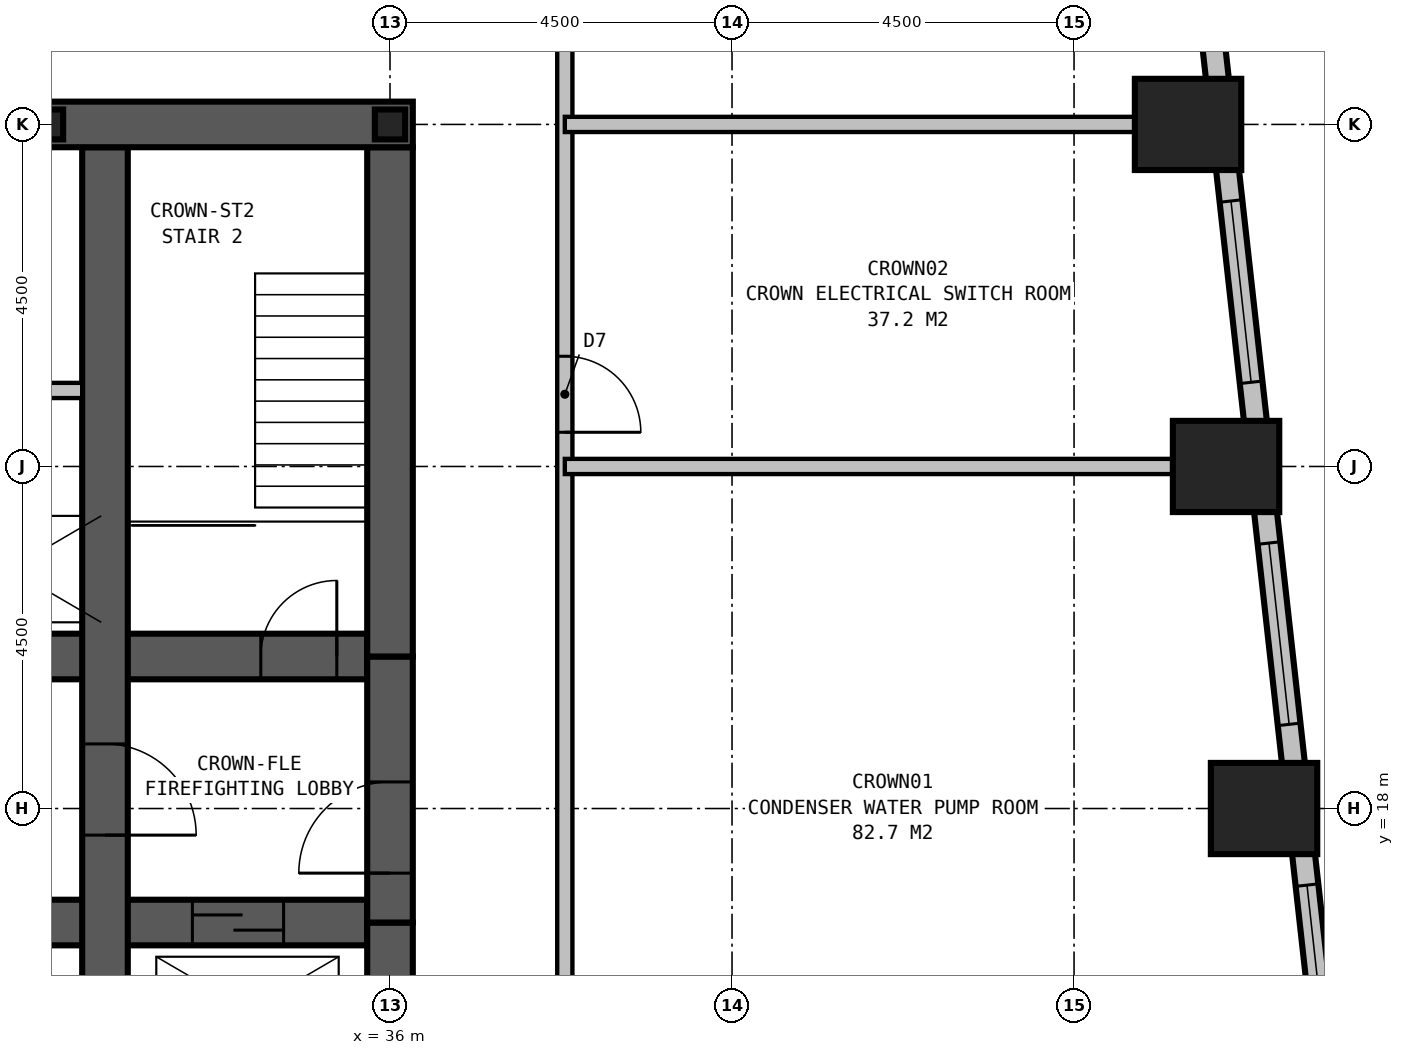
"""IFC4 building model, lengths in metres.
Left out: names, types, materials, properties, quantities, classifications, styles, units other than length and angle.
Written with IfcOpenShell. Run it as: python <this file> out.ifc"""

import sys

from ifc_helpers import new_model, si_unit, direction, frame, frame_2d, origin, origin_2d, place, context, subcontext, project, spatial, polyline, rectangle, i_section, outline, extrude, clip, halfspace, element, fill, save


model = new_model("IFC4")
c1 = context("Model", 3, precision=1e-05, world=origin(), true_north=direction((0.0, 1.0)))
c2 = subcontext(c1, "Body", "Model", "MODEL_VIEW")
j1 = project(units=[si_unit("LENGTHUNIT", "METRE"), si_unit("PLANEANGLEUNIT", "RADIAN")], contexts=[c1])
p1 = place(None, origin())
s1 = spatial("IfcSite", under=j1, at=p1, CompositionType="ELEMENT")
p2 = place(p1, origin())
s2 = spatial("IfcBuilding", under=s1, at=p2, CompositionType="ELEMENT")
p3 = place(p2, frame((0.0, 0.0, 289.7)))
s3 = spatial("IfcBuildingStorey", under=s2, at=p3, CompositionType="ELEMENT", Elevation=289.7)
p4 = place(p3, frame((47.5, 18.0, 0.0), z_axis=(0.0, 0.0, 1.0), x_axis=(1.0, 0.0, 0.0)))
e1 = element("IfcColumn", 1, at=p4, inside=s3, PredefinedType="COLUMN", context=c2, shape_type="Clipping", body=[
    clip(extrude(rectangle(XDim=1.4, YDim=1.2, at=origin_2d()), origin(), (0.0, 0.0, 1.0), 17.623), halfspace(frame((0.0, 0.0, 17.671), z_axis=(-0.294483896091, -0.25767390908, 0.920262675285), x_axis=(0.952424195267, 0.0, 0.304775576894)), False)),
])
p5 = place(p3, frame((47.0, 22.5, 0.0), z_axis=(0.0, 0.0, 1.0), x_axis=(1.0, 0.0, 0.0)))
e2 = element("IfcColumn", 2, at=p5, inside=s3, PredefinedType="COLUMN", context=c2, shape_type="Clipping", body=[
    clip(extrude(rectangle(XDim=1.4, YDim=1.2, at=origin_2d()), origin(), (0.0, 0.0, 1.0), 18.723), halfspace(frame((0.0, 0.0, 18.771), z_axis=(-0.294483896091, -0.25767390908, 0.920262675285), x_axis=(0.952424195267, 0.0, 0.304775576894)), False)),
])
p6 = place(p3, frame((46.5, 27.0, 0.0), z_axis=(0.0, 0.0, 1.0), x_axis=(1.0, 0.0, 0.0)))
e3 = element("IfcColumn", 3, at=p6, inside=s3, PredefinedType="COLUMN", context=c2, shape_type="Clipping", body=[
    clip(extrude(rectangle(XDim=1.4, YDim=1.2, at=origin_2d()), origin(), (0.0, 0.0, 1.0), 19.823), halfspace(frame((0.0, 0.0, 19.871), z_axis=(-0.294483896091, -0.25767390908, 0.920262675285), x_axis=(0.952424195267, 0.0, 0.304775576894)), False)),
])
p7 = place(p3, frame((36.3, 27.0, 0.0), z_axis=(0.0, 0.0, 1.0), x_axis=(-1.0, 0.0, 0.0)))
e4 = element("IfcWall", 4, at=p7, inside=s3, PredefinedType="SHEAR", context=c2, shape_type="SweptSolid", body=[
    extrude(rectangle(XDim=23.6, YDim=0.6, at=frame_2d((11.8, 0.0))), origin(), (0.0, 0.0, 1.0), 4.0),
])
p8 = place(p7, frame((17.05, 0.0, 0.0)))
e5 = element("IfcOpeningElement", 5, at=p8, cuts=e4, PredefinedType="OPENING", context=c2, shape_type="SweptSolid", body=[
    extrude(rectangle(XDim=1.0, YDim=2.1, at=frame_2d((0.5, 1.05))), frame((0.0, 0.31, 0.0), z_axis=(0.0, -1.0, 0.0), x_axis=(1.0, 0.0, 0.0)), (0.0, 0.0, 1.0), 0.62),
])
p9 = place(p7, frame((12.05, 0.0, 0.0)))
e6 = element("IfcOpeningElement", 6, at=p9, cuts=e4, PredefinedType="OPENING", context=c2, shape_type="SweptSolid", body=[
    extrude(rectangle(XDim=1.0, YDim=2.1, at=frame_2d((0.5, 1.05))), frame((0.0, 0.31, 0.0), z_axis=(0.0, -1.0, 0.0), x_axis=(1.0, 0.0, 0.0)), (0.0, 0.0, 1.0), 0.62),
])
p10 = place(p7, frame((7.05, 0.0, 0.0)))
e7 = element("IfcOpeningElement", 7, at=p10, cuts=e4, PredefinedType="OPENING", context=c2, shape_type="SweptSolid", body=[
    extrude(rectangle(XDim=1.0, YDim=2.1, at=frame_2d((0.5, 1.05))), frame((0.0, 0.31, 0.0), z_axis=(0.0, -1.0, 0.0), x_axis=(1.0, 0.0, 0.0)), (0.0, 0.0, 1.0), 0.62),
])
p11 = place(p3, frame((32.25, 13.8, 0.0), z_axis=(0.0, 0.0, 1.0), x_axis=(0.0, 1.0, 0.0)))
e8 = element("IfcWall", 8, at=p11, inside=s3, PredefinedType="SHEAR", context=c2, shape_type="SweptSolid", body=[
    extrude(rectangle(XDim=12.9, YDim=0.6, at=frame_2d((6.45, 0.0))), origin(), (0.0, 0.0, 1.0), 4.0),
])
p12 = place(p11, frame((5.05, 0.0, 0.0), z_axis=(0.0, 0.0, 1.0), x_axis=(-1.0, 0.0, 0.0)))
e9 = element("IfcOpeningElement", 9, at=p12, cuts=e8, PredefinedType="OPENING", context=c2, shape_type="SweptSolid", body=[
    extrude(rectangle(XDim=1.2, YDim=2.1, at=frame_2d((0.6, 1.05))), frame((0.0, 0.31, 0.0), z_axis=(0.0, -1.0, 0.0), x_axis=(1.0, 0.0, 0.0)), (0.0, 0.0, 1.0), 0.62),
])
p13 = place(p3, frame((13.8, 16.5, 0.0), z_axis=(0.0, 0.0, 1.0), x_axis=(1.0, 0.0, 0.0)))
e10 = element("IfcWall", 10, at=p13, inside=s3, PredefinedType="SHEAR", context=c2, shape_type="SweptSolid", body=[
    extrude(rectangle(XDim=21.9, YDim=0.6, at=frame_2d((10.95, 0.0))), origin(), (0.0, 0.0, 1.0), 4.0),
])
p14 = place(p13, frame((5.75, 0.0, 0.0), z_axis=(0.0, 0.0, 1.0), x_axis=(-1.0, 0.0, 0.0)))
e11 = element("IfcOpeningElement", 11, at=p14, cuts=e10, PredefinedType="OPENING", context=c2, shape_type="SweptSolid", body=[
    extrude(rectangle(XDim=1.0, YDim=2.1, at=frame_2d((0.5, 1.05))), frame((0.0, 0.31, 0.0), z_axis=(0.0, -1.0, 0.0), x_axis=(1.0, 0.0, 0.0)), (0.0, 0.0, 1.0), 0.62),
])
p15 = place(p13, frame((10.2, 0.0, 0.0), z_axis=(0.0, 0.0, 1.0), x_axis=(-1.0, 0.0, 0.0)))
e12 = element("IfcOpeningElement", 12, at=p15, cuts=e10, PredefinedType="OPENING", context=c2, shape_type="SweptSolid", body=[
    extrude(rectangle(XDim=1.0, YDim=2.1, at=frame_2d((0.5, 1.05))), frame((0.0, 0.31, 0.0), z_axis=(0.0, -1.0, 0.0), x_axis=(1.0, 0.0, 0.0)), (0.0, 0.0, 1.0), 0.62),
])
p16 = place(p13, frame((12.7, 0.0, 0.0), z_axis=(0.0, 0.0, 1.0), x_axis=(-1.0, 0.0, 0.0)))
e13 = element("IfcOpeningElement", 13, at=p16, cuts=e10, PredefinedType="OPENING", context=c2, shape_type="SweptSolid", body=[
    extrude(rectangle(XDim=1.0, YDim=2.1, at=frame_2d((0.5, 1.05))), frame((0.0, 0.31, 0.0), z_axis=(0.0, -1.0, 0.0), x_axis=(1.0, 0.0, 0.0)), (0.0, 0.0, 1.0), 0.62),
])
p17 = place(p13, frame((17.15, 0.0, 0.0), z_axis=(0.0, 0.0, 1.0), x_axis=(-1.0, 0.0, 0.0)))
e14 = element("IfcOpeningElement", 14, at=p17, cuts=e10, PredefinedType="OPENING", context=c2, shape_type="SweptSolid", body=[
    extrude(rectangle(XDim=1.0, YDim=2.1, at=frame_2d((0.5, 1.05))), frame((0.0, 0.31, 0.0), z_axis=(0.0, -1.0, 0.0), x_axis=(1.0, 0.0, 0.0)), (0.0, 0.0, 1.0), 0.62),
])
p18 = place(p13, frame((0.6, 0.0, 0.0)))
e15 = element("IfcOpeningElement", 15, at=p18, cuts=e10, PredefinedType="OPENING", context=c2, shape_type="SweptSolid", body=[
    extrude(rectangle(XDim=1.2, YDim=2.1, at=frame_2d((0.6, 1.05))), frame((0.0, 0.31, 0.0), z_axis=(0.0, -1.0, 0.0), x_axis=(1.0, 0.0, 0.0)), (0.0, 0.0, 1.0), 0.62),
])
p19 = place(p13, frame((19.6, 0.0, 0.0)))
e16 = element("IfcOpeningElement", 16, at=p19, cuts=e10, PredefinedType="OPENING", context=c2, shape_type="SweptSolid", body=[
    extrude(rectangle(XDim=1.2, YDim=2.1, at=frame_2d((0.6, 1.05))), frame((0.0, 0.31, 0.0), z_axis=(0.0, -1.0, 0.0), x_axis=(1.0, 0.0, 0.0)), (0.0, 0.0, 1.0), 0.62),
])
p20 = place(p3, frame((13.8, 20.0, 0.0), z_axis=(0.0, 0.0, 1.0), x_axis=(1.0, 0.0, 0.0)))
e17 = element("IfcWall", 17, at=p20, inside=s3, PredefinedType="SHEAR", context=c2, shape_type="SweptSolid", body=[
    extrude(rectangle(XDim=21.9, YDim=0.6, at=frame_2d((10.95, 0.0))), origin(), (0.0, 0.0, 1.0), 4.0),
])
p21 = place(p20, frame((0.5, 0.0, 0.0)))
e18 = element("IfcOpeningElement", 18, at=p21, cuts=e17, PredefinedType="OPENING", context=c2, shape_type="SweptSolid", body=[
    extrude(rectangle(XDim=1.0, YDim=2.1, at=frame_2d((0.5, 1.05))), frame((0.0, 0.31, 0.0), z_axis=(0.0, -1.0, 0.0), x_axis=(1.0, 0.0, 0.0)), (0.0, 0.0, 1.0), 0.62),
])
p22 = place(p20, frame((20.5, 0.0, 0.0)))
e19 = element("IfcOpeningElement", 19, at=p22, cuts=e17, PredefinedType="OPENING", context=c2, shape_type="SweptSolid", body=[
    extrude(rectangle(XDim=1.0, YDim=2.1, at=frame_2d((0.5, 1.05))), frame((0.0, 0.31, 0.0), z_axis=(0.0, -1.0, 0.0), x_axis=(1.0, 0.0, 0.0)), (0.0, 0.0, 1.0), 0.62),
])
p23 = place(p20, frame((4.75, 0.0, 0.0)))
e20 = element("IfcOpeningElement", 20, at=p23, cuts=e17, PredefinedType="OPENING", context=c2, shape_type="SweptSolid", body=[
    extrude(rectangle(XDim=1.0, YDim=2.1, at=frame_2d((0.5, 1.05))), frame((0.0, 0.31, 0.0), z_axis=(0.0, -1.0, 0.0), x_axis=(1.0, 0.0, 0.0)), (0.0, 0.0, 1.0), 0.62),
])
p24 = place(p20, frame((6.7, 0.0, 0.0)))
e21 = element("IfcOpeningElement", 21, at=p24, cuts=e17, PredefinedType="OPENING", context=c2, shape_type="SweptSolid", body=[
    extrude(rectangle(XDim=1.0, YDim=2.1, at=frame_2d((0.5, 1.05))), frame((0.0, 0.31, 0.0), z_axis=(0.0, -1.0, 0.0), x_axis=(1.0, 0.0, 0.0)), (0.0, 0.0, 1.0), 0.62),
])
p25 = place(p3, frame((36.0, 13.8, 0.0), z_axis=(0.0, 0.0, 1.0), x_axis=(0.0, 1.0, 0.0)))
e22 = element("IfcWall", 22, at=p25, inside=s3, PredefinedType="SHEAR", context=c2, shape_type="SweptSolid", body=[
    extrude(rectangle(XDim=2.7, YDim=0.6, at=frame_2d((1.35, 0.0))), origin(), (0.0, 0.0, 1.0), 4.0),
])
p26 = place(p3, frame((36.0, 16.5, 0.0), z_axis=(0.0, 0.0, 1.0), x_axis=(0.0, 1.0, 0.0)))
e23 = element("IfcWall", 23, at=p26, inside=s3, PredefinedType="SHEAR", context=c2, shape_type="SweptSolid", body=[
    extrude(rectangle(XDim=3.5, YDim=0.6, at=frame_2d((1.75, 0.0))), origin(), (0.0, 0.0, 1.0), 4.0),
])
p27 = place(p26, frame((0.65, 0.0, 0.0)))
e24 = element("IfcOpeningElement", 24, at=p27, cuts=e23, PredefinedType="OPENING", context=c2, shape_type="SweptSolid", body=[
    extrude(rectangle(XDim=1.2, YDim=2.1, at=frame_2d((0.6, 1.05))), frame((0.0, 0.31, 0.0), z_axis=(0.0, -1.0, 0.0), x_axis=(1.0, 0.0, 0.0)), (0.0, 0.0, 1.0), 0.62),
])
p28 = place(p3, frame((36.0, 20.0, 0.0), z_axis=(0.0, 0.0, 1.0), x_axis=(0.0, 1.0, 0.0)))
e25 = element("IfcWall", 25, at=p28, inside=s3, PredefinedType="SHEAR", context=c2, shape_type="SweptSolid", body=[
    extrude(rectangle(XDim=6.7, YDim=0.6, at=frame_2d((3.35, 0.0))), origin(), (0.0, 0.0, 1.0), 4.0),
])
p29 = place(p3, frame((31.5, 27.0, 4.0), z_axis=(0.0, 0.0, 1.0), x_axis=(1.0, 0.0, 0.0)))
e26 = element("IfcColumn", 26, at=p29, inside=s3, PredefinedType="COLUMN", context=c2, shape_type="SweptSolid", body=[
    extrude(i_section(OverallWidth=0.399, OverallDepth=0.394, WebThickness=0.023, FlangeThickness=0.037, FilletRadius=0.015, at=origin_2d()), origin(), (0.0, 0.0, 1.0), 10.05),
])
p30 = place(p3, frame((36.0, 27.0, 4.0), z_axis=(0.0, 0.0, 1.0), x_axis=(1.0, 0.0, 0.0)))
e27 = element("IfcColumn", 27, at=p30, inside=s3, PredefinedType="COLUMN", context=c2, shape_type="SweptSolid", body=[
    extrude(i_section(OverallWidth=0.399, OverallDepth=0.394, WebThickness=0.023, FlangeThickness=0.037, FilletRadius=0.015, at=origin_2d()), origin(), (0.0, 0.0, 1.0), 11.49),
])
p31 = place(p3, frame((49.519, 3.901, -0.3), z_axis=(0.0, 0.0, 1.0), x_axis=(-0.110429082637, 0.993884006164, 0.0)))
e28 = element("IfcWall", 28, at=p31, inside=s3, PredefinedType="STANDARD", context=c2, shape_type="Clipping", body=[
    clip(extrude(outline(polyline([(0.0, 0.0), (32.899, 0.0), (32.899, 22.662), (0.0, 14.669), (0.0, 0.0)])), frame((0.0, 0.15, 0.0), z_axis=(0.0, -1.0, 0.0), x_axis=(1.0, 0.0, 0.0)), (0.0, 0.0, 1.0), 0.3), halfspace(frame((0.0, 0.0, 14.669), z_axis=(-0.223578390543, 0.321137527797, 0.920262675285), x_axis=(0.971732868163, 0.0, 0.236083105984)), False)),
])
p32 = place(p31, frame((1.717, 0.0, 0.8)))
e29 = element("IfcOpeningElement", 29, at=p32, cuts=e28, PredefinedType="OPENING", context=c2, shape_type="SweptSolid", body=[
    extrude(rectangle(XDim=2.4, YDim=1.8, at=frame_2d((1.2, 0.9))), frame((0.0, 0.16, 0.0), z_axis=(0.0, -1.0, 0.0), x_axis=(1.0, 0.0, 0.0)), (0.0, 0.0, 1.0), 0.32),
])
p33 = place(p31, frame((6.245, 0.0, 0.8)))
e30 = element("IfcOpeningElement", 30, at=p33, cuts=e28, PredefinedType="OPENING", context=c2, shape_type="SweptSolid", body=[
    extrude(rectangle(XDim=2.4, YDim=1.8, at=frame_2d((1.2, 0.9))), frame((0.0, 0.16, 0.0), z_axis=(0.0, -1.0, 0.0), x_axis=(1.0, 0.0, 0.0)), (0.0, 0.0, 1.0), 0.32),
])
p34 = place(p31, frame((10.772, 0.0, 0.8)))
e31 = element("IfcOpeningElement", 31, at=p34, cuts=e28, PredefinedType="OPENING", context=c2, shape_type="SweptSolid", body=[
    extrude(rectangle(XDim=2.4, YDim=1.8, at=frame_2d((1.2, 0.9))), frame((0.0, 0.16, 0.0), z_axis=(0.0, -1.0, 0.0), x_axis=(1.0, 0.0, 0.0)), (0.0, 0.0, 1.0), 0.32),
])
p35 = place(p31, frame((15.3, 0.0, 0.8)))
e32 = element("IfcOpeningElement", 32, at=p35, cuts=e28, PredefinedType="OPENING", context=c2, shape_type="SweptSolid", body=[
    extrude(rectangle(XDim=2.4, YDim=1.8, at=frame_2d((1.2, 0.9))), frame((0.0, 0.16, 0.0), z_axis=(0.0, -1.0, 0.0), x_axis=(1.0, 0.0, 0.0)), (0.0, 0.0, 1.0), 0.32),
])
p36 = place(p31, frame((19.828, 0.0, 0.8)))
e33 = element("IfcOpeningElement", 33, at=p36, cuts=e28, PredefinedType="OPENING", context=c2, shape_type="SweptSolid", body=[
    extrude(rectangle(XDim=2.4, YDim=1.8, at=frame_2d((1.2, 0.9))), frame((0.0, 0.16, 0.0), z_axis=(0.0, -1.0, 0.0), x_axis=(1.0, 0.0, 0.0)), (0.0, 0.0, 1.0), 0.32),
])
p37 = place(p31, frame((24.355, 0.0, 0.8)))
e34 = element("IfcOpeningElement", 34, at=p37, cuts=e28, PredefinedType="OPENING", context=c2, shape_type="SweptSolid", body=[
    extrude(rectangle(XDim=2.4, YDim=1.8, at=frame_2d((1.2, 0.9))), frame((0.0, 0.16, 0.0), z_axis=(0.0, -1.0, 0.0), x_axis=(1.0, 0.0, 0.0)), (0.0, 0.0, 1.0), 0.32),
])
p38 = place(p31, frame((28.883, 0.0, 0.8)))
e35 = element("IfcOpeningElement", 35, at=p38, cuts=e28, PredefinedType="OPENING", context=c2, shape_type="SweptSolid", body=[
    extrude(rectangle(XDim=2.4, YDim=1.8, at=frame_2d((1.2, 0.9))), frame((0.0, 0.16, 0.0), z_axis=(0.0, -1.0, 0.0), x_axis=(1.0, 0.0, 0.0)), (0.0, 0.0, 1.0), 0.32),
])
p39 = place(p3, frame((38.3, 11.2, 0.0), z_axis=(0.0, 0.0, 1.0), x_axis=(0.0, 1.0, 0.0)))
e36 = element("IfcWall", 36, at=p39, inside=s3, PredefinedType="PARTITIONING", context=c2, shape_type="SweptSolid", body=[
    extrude(rectangle(XDim=18.1, YDim=0.2, at=frame_2d((9.05, 0.0))), origin(), (0.0, 0.0, 1.0), 4.0),
])
p40 = place(p39, frame((3.95, 0.0, 0.0), z_axis=(0.0, 0.0, 1.0), x_axis=(-1.0, 0.0, 0.0)))
e37 = element("IfcOpeningElement", 37, at=p40, cuts=e36, PredefinedType="OPENING", context=c2, shape_type="SweptSolid", body=[
    extrude(rectangle(XDim=1.2, YDim=2.1, at=frame_2d((0.6, 1.05))), frame((0.0, 0.11, 0.0), z_axis=(0.0, -1.0, 0.0), x_axis=(1.0, 0.0, 0.0)), (0.0, 0.0, 1.0), 0.22),
])
p41 = place(p39, frame((12.75, 0.0, 0.0), z_axis=(0.0, 0.0, 1.0), x_axis=(-1.0, 0.0, 0.0)))
e38 = element("IfcOpeningElement", 38, at=p41, cuts=e36, PredefinedType="OPENING", context=c2, shape_type="SweptSolid", body=[
    extrude(rectangle(XDim=1.0, YDim=2.1, at=frame_2d((0.5, 1.05))), frame((0.0, 0.11, 0.0), z_axis=(0.0, -1.0, 0.0), x_axis=(1.0, 0.0, 0.0)), (0.0, 0.0, 1.0), 0.22),
])
p42 = place(p3, frame((38.3, 22.5, 0.0), z_axis=(0.0, 0.0, 1.0), x_axis=(1.0, 0.0, 0.0)))
e39 = element("IfcWall", 39, at=p42, inside=s3, PredefinedType="PARTITIONING", context=c2, shape_type="SweptSolid", body=[
    extrude(rectangle(XDim=7.999, YDim=0.2, at=frame_2d((4.0, 0.0))), origin(), (0.0, 0.0, 1.0), 4.0),
])
p43 = place(p3, frame((38.3, 27.0, 0.0), z_axis=(0.0, 0.0, 1.0), x_axis=(1.0, 0.0, 0.0)))
e40 = element("IfcWall", 40, at=p43, inside=s3, PredefinedType="PARTITIONING", context=c2, shape_type="SweptSolid", body=[
    extrude(rectangle(XDim=7.499, YDim=0.2, at=frame_2d((3.75, 0.0))), origin(), (0.0, 0.0, 1.0), 4.0),
])
p44 = place(p3, frame((17.55, 23.5, 0.0), z_axis=(0.0, 0.0, 1.0), x_axis=(1.0, 0.0, 0.0)))
e41 = element("IfcWall", 41, at=p44, inside=s3, PredefinedType="PARTITIONING", context=c2, shape_type="SweptSolid", body=[
    extrude(rectangle(XDim=14.4, YDim=0.2, at=frame_2d((7.2, 0.0))), origin(), (0.0, 0.0, 1.0), 4.0),
])
p45 = place(p34, origin())
e42 = element("IfcWindow", 42, at=p45, inside=s3, PartitioningType="SINGLE_PANEL", PredefinedType="USERDEFINED", context=c2, shape_type="SweptSolid", body=[
    extrude(rectangle(XDim=2.4, YDim=1.8, at=frame_2d((1.2, 0.9))), frame((0.0, 0.03, 0.0), z_axis=(0.0, -1.0, 0.0), x_axis=(1.0, 0.0, 0.0)), (0.0, 0.0, 1.0), 0.06),
])
fill(e31, e42)
p46 = place(p35, origin())
e43 = element("IfcWindow", 43, at=p46, inside=s3, PartitioningType="SINGLE_PANEL", PredefinedType="USERDEFINED", context=c2, shape_type="SweptSolid", body=[
    extrude(rectangle(XDim=2.4, YDim=1.8, at=frame_2d((1.2, 0.9))), frame((0.0, 0.03, 0.0), z_axis=(0.0, -1.0, 0.0), x_axis=(1.0, 0.0, 0.0)), (0.0, 0.0, 1.0), 0.06),
])
fill(e32, e43)
p47 = place(p36, origin())
e44 = element("IfcWindow", 44, at=p47, inside=s3, PartitioningType="SINGLE_PANEL", PredefinedType="USERDEFINED", context=c2, shape_type="SweptSolid", body=[
    extrude(rectangle(XDim=2.4, YDim=1.8, at=frame_2d((1.2, 0.9))), frame((0.0, 0.03, 0.0), z_axis=(0.0, -1.0, 0.0), x_axis=(1.0, 0.0, 0.0)), (0.0, 0.0, 1.0), 0.06),
])
fill(e33, e44)
p48 = place(p41, origin())
e45 = element("IfcDoor", 45, at=p48, inside=s3, OperationType="SINGLE_SWING_RIGHT", PredefinedType="DOOR", context=c2, shape_type="SweptSolid", body=[
    extrude(rectangle(XDim=1.0, YDim=2.1, at=frame_2d((0.5, 1.05))), frame((0.0, 0.025, 0.0), z_axis=(0.0, -1.0, 0.0), x_axis=(1.0, 0.0, 0.0)), (0.0, 0.0, 1.0), 0.05),
])
fill(e38, e45)
p49 = place(p27, origin())
e46 = element("IfcDoor", 46, at=p49, inside=s3, OperationType="SINGLE_SWING_LEFT", PredefinedType="DOOR", context=c2, shape_type="SweptSolid", body=[
    extrude(rectangle(XDim=1.2, YDim=2.1, at=frame_2d((0.6, 1.05))), frame((0.0, 0.3, 0.0), z_axis=(0.0, -1.0, 0.0), x_axis=(1.0, 0.0, 0.0)), (0.0, 0.0, 1.0), 0.6),
])
fill(e24, e46)
p50 = place(p12, origin())
e47 = element("IfcDoor", 47, at=p50, inside=s3, OperationType="SINGLE_SWING_RIGHT", PredefinedType="DOOR", context=c2, shape_type="SweptSolid", body=[
    extrude(rectangle(XDim=1.2, YDim=2.1, at=frame_2d((0.6, 1.05))), frame((0.0, 0.3, 0.0), z_axis=(0.0, -1.0, 0.0), x_axis=(1.0, 0.0, 0.0)), (0.0, 0.0, 1.0), 0.6),
])
fill(e9, e47)
p51 = place(p22, origin())
e48 = element("IfcDoor", 48, at=p51, inside=s3, OperationType="SINGLE_SWING_RIGHT", PredefinedType="DOOR", context=c2, shape_type="SweptSolid", body=[
    extrude(rectangle(XDim=1.0, YDim=2.1, at=frame_2d((0.5, 1.05))), frame((0.0, 0.3, 0.0), z_axis=(0.0, -1.0, 0.0), x_axis=(1.0, 0.0, 0.0)), (0.0, 0.0, 1.0), 0.6),
])
fill(e19, e48)
p52 = place(p19, origin())
e49 = element("IfcDoor", 49, at=p52, inside=s3, OperationType="SLIDING_TO_LEFT", PredefinedType="DOOR", context=c2, shape_type="SweptSolid", body=[
    extrude(rectangle(XDim=1.2, YDim=2.1, at=frame_2d((0.6, 1.05))), frame((0.0, 0.3, 0.0), z_axis=(0.0, -1.0, 0.0), x_axis=(1.0, 0.0, 0.0)), (0.0, 0.0, 1.0), 0.6),
])
fill(e16, e49)
save(model, sys.argv[1])
